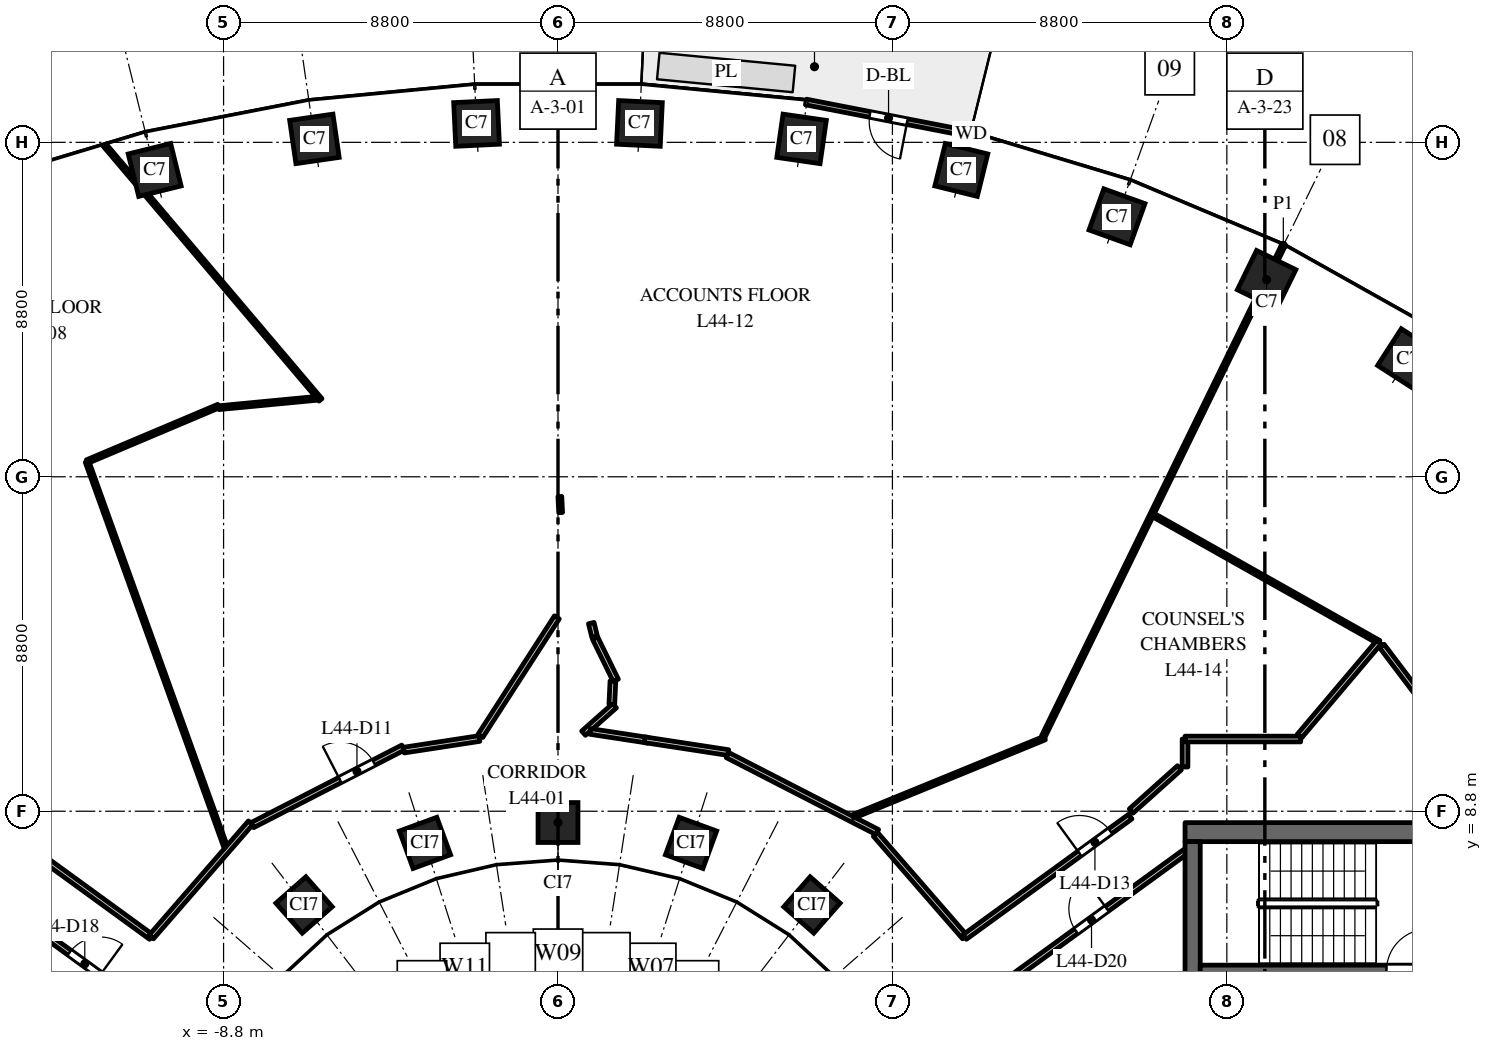
"""IFC4 building model, lengths in metres.
Left out: names, types, materials, properties, quantities, classifications, styles, units other than length and angle.
Written with IfcOpenShell. Run it as: python <this file> out.ifc"""

import sys

from ifc_helpers import new_model, si_unit, direction, frame, frame_2d, origin, origin_2d, place, context, subcontext, project, spatial, rectangle, extrude, element, fill, save


model = new_model("IFC4")
c1 = context("Model", 3, precision=1e-05, world=origin(), true_north=direction((0.0, 1.0)))
c2 = subcontext(c1, "Body", "Model", "MODEL_VIEW")
j1 = project(units=[si_unit("LENGTHUNIT", "METRE"), si_unit("PLANEANGLEUNIT", "RADIAN")], contexts=[c1])
p1 = place(None, origin())
s1 = spatial("IfcSite", under=j1, at=p1, CompositionType="ELEMENT")
p2 = place(p1, origin())
s2 = spatial("IfcBuilding", under=s1, at=p2, CompositionType="ELEMENT")
p3 = place(p2, frame((0.0, 0.0, 190.0)))
s3 = spatial("IfcBuildingStorey", under=s2, at=p3, CompositionType="ELEMENT", Elevation=190.0)
for number, where, z_axis, x_axis in (
    (1, (22.362, 20.7, 0.0), (0.0, 0.0, 1.0), (-0.84, 0.542, 0.0)),
    (2, (18.646, 22.785, 0.0), (0.0, 0.0, 1.0), (-0.898, 0.439, 0.0)),
    (3, (14.709, 24.441, 0.0), (0.0, 0.0, 1.0), (-0.941, 0.338, 0.0)),
    (4, (10.613, 25.674, 0.0), (0.0, 0.0, 1.0), (-0.971, 0.24, 0.0)),
    (5, (6.409, 26.491, 0.0), (0.0, 0.0, 1.0), (-0.99, 0.143, 0.0)),
    (6, (2.143, 26.898, 0.0), (0.0, 0.0, 1.0), (-0.999, 0.048, 0.0)),
    (7, (-2.143, 26.898, 0.0), (0.0, 0.0, 1.0), (-0.999, -0.048, 0.0)),
    (8, (-6.409, 26.491, 0.0), (0.0, 0.0, 1.0), (-0.99, -0.143, 0.0)),
    (9, (-10.613, 25.674, 0.0), (0.0, 0.0, 1.0), (-0.971, -0.24, 0.0)),
):
    element("IfcColumn", number, at=place(p3, frame(where, z_axis=z_axis, x_axis=x_axis)), inside=s3, PredefinedType="COLUMN", context=c2, shape_type="SweptSolid", body=[
        extrude(rectangle(XDim=1.15, YDim=1.15, at=origin_2d()), origin(), (0.0, 0.0, 1.0), 4.0),
    ])
for number, where, z_axis, x_axis in (
    (10, (6.682, 6.334, 0.0), (0.0, 0.0, 1.0), (-0.751, 0.66, 0.0)),
    (11, (3.501, 7.967, 0.0), (0.0, 0.0, 1.0), (-0.939, 0.344, 0.0)),
    (12, (0.0, 8.503, 0.0), (0.0, 0.0, 1.0), (-1.0, 0.0, 0.0)),
    (13, (-3.501, 7.967, 0.0), (0.0, 0.0, 1.0), (-0.939, -0.344, 0.0)),
    (14, (-6.682, 6.334, 0.0), (0.0, 0.0, 1.0), (-0.751, -0.66, 0.0)),
):
    element("IfcColumn", number, at=place(p3, frame(where, z_axis=z_axis, x_axis=x_axis)), inside=s3, PredefinedType="COLUMN", context=c2, shape_type="SweptSolid", body=[
        extrude(rectangle(XDim=1.05, YDim=1.05, at=origin_2d()), origin(), (0.0, 0.0, 1.0), 4.0),
    ])
p4 = place(p3, frame((16.5, 8.25, 0.0), z_axis=(0.0, 0.0, 1.0), x_axis=(1.0, 0.0, 0.0)))
e15 = element("IfcWall", 15, at=p4, inside=s3, PredefinedType="SHEAR", context=c2, shape_type="SweptSolid", body=[
    extrude(rectangle(XDim=15.0, YDim=0.5, at=frame_2d((7.5, 0.0))), origin(), (0.0, 0.0, 1.0), 3.7),
])
p5 = place(p4, frame((6.9, 0.0, 0.0)))
e16 = element("IfcOpeningElement", 16, at=p5, cuts=e15, PredefinedType="OPENING", context=c2, shape_type="SweptSolid", body=[
    extrude(rectangle(XDim=1.2, YDim=2.1, at=frame_2d((0.6, 1.05))), frame((0.0, 0.26, 0.0), z_axis=(0.0, -1.0, 0.0), x_axis=(1.0, 0.0, 0.0)), (0.0, 0.0, 1.0), 0.52),
])
p6 = place(p4, frame((12.425, 0.0, 0.0)))
e17 = element("IfcOpeningElement", 17, at=p6, cuts=e15, PredefinedType="OPENING", context=c2, shape_type="SweptSolid", body=[
    extrude(rectangle(XDim=0.9, YDim=2.1, at=frame_2d((0.45, 1.05))), frame((0.0, 0.26, 0.0), z_axis=(0.0, -1.0, 0.0), x_axis=(1.0, 0.0, 0.0)), (0.0, 0.0, 1.0), 0.52),
])
p7 = place(p3, frame((16.7, -8.0, 0.0), z_axis=(0.0, 0.0, 1.0), x_axis=(0.0, 1.0, 0.0)))
e18 = element("IfcWall", 18, at=p7, inside=s3, PredefinedType="SHEAR", context=c2, shape_type="SweptSolid", body=[
    extrude(rectangle(XDim=16.0, YDim=0.4, at=frame_2d((8.0, 0.0))), origin(), (0.0, 0.0, 1.0), 3.7),
])
p8 = place(p3, frame((16.9, 4.6, 0.0), z_axis=(0.0, 0.0, 1.0), x_axis=(1.0, 0.0, 0.0)))
e19 = element("IfcWall", 19, at=p8, inside=s3, PredefinedType="SHEAR", context=c2, shape_type="SweptSolid", body=[
    extrude(rectangle(XDim=6.18, YDim=0.3, at=frame_2d((3.09, 0.0))), origin(), (0.0, 0.0, 1.0), 3.7),
])
p9 = place(p8, frame((4.9, 0.0, 0.0)))
e20 = element("IfcOpeningElement", 20, at=p9, cuts=e19, PredefinedType="OPENING", context=c2, shape_type="SweptSolid", body=[
    extrude(rectangle(XDim=1.1, YDim=2.1, at=frame_2d((0.55, 1.05))), frame((0.0, 0.16, 0.0), z_axis=(0.0, -1.0, 0.0), x_axis=(1.0, 0.0, 0.0)), (0.0, 0.0, 1.0), 0.32),
])
p10 = place(p3, frame((10.871, 26.617, 0.0), z_axis=(0.0, 0.0, 1.0), x_axis=(-0.981631174778, 0.190788460615, 0.0)))
e21 = element("IfcWall", 21, at=p10, inside=s3, PredefinedType="STANDARD", context=c2, shape_type="SweptSolid", body=[
    extrude(rectangle(XDim=4.426, YDim=0.15, at=frame_2d((2.213, 0.0))), origin(), (0.0, 0.0, 1.0), 3.7),
])
p11 = place(p10, frame((1.713, 0.0, 0.0)))
e22 = element("IfcOpeningElement", 22, at=p11, cuts=e21, PredefinedType="OPENING", context=c2, shape_type="SweptSolid", body=[
    extrude(rectangle(XDim=1.0, YDim=2.4, at=frame_2d((0.5, 1.2))), frame((0.0, 0.085, 0.0), z_axis=(0.0, -1.0, 0.0), x_axis=(1.0, 0.0, 0.0)), (0.0, 0.0, 1.0), 0.17),
])
p12 = place(p3, frame((-16.5, 7.727, 0.0), z_axis=(0.0, 0.0, 1.0), x_axis=(0.808900994583, -0.587944879188, 0.0)))
e23 = element("IfcWall", 23, at=p12, inside=s3, PredefinedType="PARTITIONING", context=c2, shape_type="SweptSolid", body=[
    extrude(rectangle(XDim=6.273, YDim=0.15, at=frame_2d((3.136, 0.0))), origin(), (0.0, 0.0, 1.0), 3.7),
])
p13 = place(p12, frame((4.504, 0.0, 0.0)))
e24 = element("IfcOpeningElement", 24, at=p13, cuts=e23, PredefinedType="OPENING", context=c2, shape_type="SweptSolid", body=[
    extrude(rectangle(XDim=1.0, YDim=2.1, at=frame_2d((0.5, 1.05))), frame((0.0, 0.085, 0.0), z_axis=(0.0, -1.0, 0.0), x_axis=(1.0, 0.0, 0.0)), (0.0, 0.0, 1.0), 0.17),
])
p14 = place(p3, frame((-15.059, 8.658, 0.0), z_axis=(0.0, 0.0, 1.0), x_axis=(0.808838005268, -0.588031530816, 0.0)))
e25 = element("IfcWall", 25, at=p14, inside=s3, PredefinedType="PARTITIONING", context=c2, shape_type="SweptSolid", body=[
    extrude(rectangle(XDim=5.386, YDim=0.15, at=frame_2d((2.693, 0.0))), origin(), (0.0, 0.0, 1.0), 3.7),
])
p15 = place(p3, frame((-12.393, 17.999, 0.0), z_axis=(0.0, 0.0, 1.0), x_axis=(0.921243349635, 0.388986748816, 0.0)))
e26 = element("IfcWall", 26, at=p15, inside=s3, PredefinedType="PARTITIONING", context=c2, shape_type="SweptSolid", body=[
    extrude(rectangle(XDim=3.756, YDim=0.1, at=frame_2d((1.878, 0.0))), origin(), (0.0, 0.0, 1.0), 3.7),
])
p16 = place(p3, frame((-12.393, 17.999, 0.0), z_axis=(0.0, 0.0, 1.0), x_axis=(0.338550172492, -0.940948341146, 0.0)))
e27 = element("IfcWall", 27, at=p16, inside=s3, PredefinedType="PARTITIONING", context=c2, shape_type="SweptSolid", body=[
    extrude(rectangle(XDim=10.775, YDim=0.1, at=frame_2d((5.388, 0.0))), origin(), (0.0, 0.0, 1.0), 2.85),
])
p17 = place(p3, frame((-11.925, 26.323, 0.0), z_axis=(0.0, 0.0, 1.0), x_axis=(0.646450651597, -0.762955801505, 0.0)))
e28 = element("IfcWall", 28, at=p17, inside=s3, PredefinedType="PARTITIONING", context=c2, shape_type="SweptSolid", body=[
    extrude(rectangle(XDim=8.78, YDim=0.1, at=frame_2d((4.39, 0.0))), origin(), (0.0, 0.0, 1.0), 2.85),
])
p18 = place(p3, frame((-10.703, 5.491, 0.0), z_axis=(0.0, 0.0, 1.0), x_axis=(0.656266732873, 0.754528975802, 0.0)))
e29 = element("IfcWall", 29, at=p18, inside=s3, PredefinedType="PARTITIONING", context=c2, shape_type="SweptSolid", body=[
    extrude(rectangle(XDim=3.983, YDim=0.15, at=frame_2d((1.991, 0.0))), origin(), (0.0, 0.0, 1.0), 2.75),
])
p19 = place(p3, frame((-8.923, 19.418, 0.0), z_axis=(0.0, 0.0, 1.0), x_axis=(0.995460608392, 0.095174456346, 0.0)))
e30 = element("IfcWall", 30, at=p19, inside=s3, PredefinedType="PARTITIONING", context=c2, shape_type="SweptSolid", body=[
    extrude(rectangle(XDim=2.586, YDim=0.1, at=frame_2d((1.293, 0.0))), origin(), (0.0, 0.0, 1.0), 2.85),
])
p20 = place(p3, frame((-8.042, 8.435, 0.0), z_axis=(0.0, 0.0, 1.0), x_axis=(0.88929925529, 0.457325742268, 0.0)))
e31 = element("IfcWall", 31, at=p20, inside=s3, PredefinedType="PARTITIONING", context=c2, shape_type="SweptSolid", body=[
    extrude(rectangle(XDim=4.459, YDim=0.15, at=frame_2d((2.229, 0.0))), origin(), (0.0, 0.0, 1.0), 2.85),
])
p21 = place(p20, frame((2.594, 0.0, 0.0)))
e32 = element("IfcOpeningElement", 32, at=p21, cuts=e31, PredefinedType="OPENING", context=c2, shape_type="SweptSolid", body=[
    extrude(rectangle(XDim=1.0, YDim=2.1, at=frame_2d((0.5, 1.05))), frame((0.0, 0.085, 0.0), z_axis=(0.0, -1.0, 0.0), x_axis=(1.0, 0.0, 0.0)), (0.0, 0.0, 1.0), 0.17),
])
p22 = place(p3, frame((-4.056, 10.408, 0.0), z_axis=(0.0, 0.0, 1.0), x_axis=(0.988437567576, 0.151628410943, 0.0)))
e33 = element("IfcWall", 33, at=p22, inside=s3, PredefinedType="PARTITIONING", context=c2, shape_type="SweptSolid", body=[
    extrude(rectangle(XDim=2.011, YDim=0.15, at=frame_2d((1.005, 0.0))), origin(), (0.0, 0.0, 1.0), 3.7),
])
p23 = place(p3, frame((-2.044, 10.78, 0.0), z_axis=(0.0, 0.0, 1.0), x_axis=(0.542215200434, 0.840239654157, 0.0)))
e34 = element("IfcWall", 34, at=p23, inside=s3, PredefinedType="PARTITIONING", context=c2, shape_type="SweptSolid", body=[
    extrude(rectangle(XDim=3.714, YDim=0.15, at=frame_2d((1.857, 0.0))), origin(), (0.0, 0.0, 1.0), 2.85),
])
p24 = place(p3, frame((0.049, 17.081, 0.0), z_axis=(0.0, 0.0, 1.0), x_axis=(0.047263912187, -0.998882436829, 0.0)))
e35 = element("IfcWall", 35, at=p24, inside=s3, PredefinedType="PARTITIONING", context=c2, shape_type="SweptSolid", body=[
    extrude(rectangle(XDim=0.424, YDim=0.1, at=frame_2d((0.212, 0.0))), origin(), (0.0, 0.0, 1.0), 3.7),
])
p25 = place(p3, frame((0.673, 10.854, 0.0), z_axis=(0.0, 0.0, 1.0), x_axis=(0.748534116479, 0.663096279937, 0.0)))
e36 = element("IfcWall", 36, at=p25, inside=s3, PredefinedType="PARTITIONING", context=c2, shape_type="SweptSolid", body=[
    extrude(rectangle(XDim=1.089, YDim=0.15, at=frame_2d((0.544, 0.0))), origin(), (0.0, 0.0, 1.0), 3.7),
])
p26 = place(p3, frame((0.845, 10.9, 0.0), z_axis=(0.0, 0.0, 1.0), x_axis=(0.988539396125, -0.15096311572, 0.0)))
e37 = element("IfcWall", 37, at=p26, inside=s3, PredefinedType="PARTITIONING", context=c2, shape_type="SweptSolid", body=[
    extrude(rectangle(XDim=1.543, YDim=0.15, at=frame_2d((0.771, 0.0))), origin(), (0.0, 0.0, 1.0), 3.7),
])
p27 = place(p3, frame((0.875, 13.751, 0.0), z_axis=(0.0, 0.0, 1.0), x_axis=(0.239631306226, -0.970863964249, 0.0)))
e38 = element("IfcWall", 38, at=p27, inside=s3, PredefinedType="PARTITIONING", context=c2, shape_type="SweptSolid", body=[
    extrude(rectangle(XDim=0.376, YDim=0.15, at=frame_2d((0.188, 0.0))), origin(), (0.0, 0.0, 1.0), 3.7),
])
p28 = place(p3, frame((0.977, 13.353, 0.0), z_axis=(0.0, 0.0, 1.0), x_axis=(0.439698529064, -0.898145424494, 0.0)))
e39 = element("IfcWall", 39, at=p28, inside=s3, PredefinedType="PARTITIONING", context=c2, shape_type="SweptSolid", body=[
    extrude(rectangle(XDim=1.237, YDim=0.15, at=frame_2d((0.619, 0.0))), origin(), (0.0, 0.0, 1.0), 3.7),
])
p29 = place(p3, frame((1.416, 11.612, 0.0), z_axis=(0.0, 0.0, 1.0), x_axis=(0.047263226181, 0.998882469288, 0.0)))
e40 = element("IfcWall", 40, at=p29, inside=s3, PredefinedType="PARTITIONING", context=c2, shape_type="SweptSolid", body=[
    extrude(rectangle(XDim=0.615, YDim=0.15, at=frame_2d((0.307, 0.0))), origin(), (0.0, 0.0, 1.0), 3.7),
])
p30 = place(p3, frame((2.277, 10.681, 0.0), z_axis=(0.0, 0.0, 1.0), x_axis=(0.988505563548, -0.151184492707, 0.0)))
e41 = element("IfcWall", 41, at=p30, inside=s3, PredefinedType="PARTITIONING", context=c2, shape_type="SweptSolid", body=[
    extrude(rectangle(XDim=2.229, YDim=0.15, at=frame_2d((1.114, 0.0))), origin(), (0.0, 0.0, 1.0), 2.85),
])
p31 = place(p3, frame((4.459, 10.278, 0.0), z_axis=(0.0, 0.0, 1.0), x_axis=(0.889360097773, -0.457207410799, 0.0)))
e42 = element("IfcWall", 42, at=p31, inside=s3, PredefinedType="PARTITIONING", context=c2, shape_type="SweptSolid", body=[
    extrude(rectangle(XDim=4.434, YDim=0.15, at=frame_2d((2.217, 0.0))), origin(), (0.0, 0.0, 1.0), 2.85),
])
p32 = place(p3, frame((7.765, 8.662, 0.0), z_axis=(0.0, 0.0, 1.0), x_axis=(0.92549839732, 0.378751523506, 0.0)))
e43 = element("IfcWall", 43, at=p32, inside=s3, PredefinedType="PARTITIONING", context=c2, shape_type="SweptSolid", body=[
    extrude(rectangle(XDim=5.447, YDim=0.1, at=frame_2d((2.723, 0.0))), origin(), (0.0, 0.0, 1.0), 3.7),
])
p33 = place(p3, frame((8.355, 8.19, 0.0), z_axis=(0.0, 0.0, 1.0), x_axis=(0.656332459324, -0.754471803871, 0.0)))
e44 = element("IfcWall", 44, at=p33, inside=s3, PredefinedType="PARTITIONING", context=c2, shape_type="SweptSolid", body=[
    extrude(rectangle(XDim=3.577, YDim=0.15, at=frame_2d((1.789, 0.0))), origin(), (0.0, 0.0, 1.0), 2.75),
])
p34 = place(p3, frame((10.703, 5.491, 0.0), z_axis=(0.0, 0.0, 1.0), x_axis=(0.808838005268, 0.588031530816, 0.0)))
e45 = element("IfcWall", 45, at=p34, inside=s3, PredefinedType="PARTITIONING", context=c2, shape_type="SweptSolid", body=[
    extrude(rectangle(XDim=5.386, YDim=0.15, at=frame_2d((2.693, 0.0))), origin(), (0.0, 0.0, 1.0), 2.75),
])
p35 = place(p34, frame((3.736, 0.0, 0.0)))
e46 = element("IfcOpeningElement", 46, at=p35, cuts=e45, PredefinedType="OPENING", context=c2, shape_type="SweptSolid", body=[
    extrude(rectangle(XDim=1.0, YDim=2.1, at=frame_2d((0.5, 1.05))), frame((0.0, 0.085, 0.0), z_axis=(0.0, -1.0, 0.0), x_axis=(1.0, 0.0, 0.0)), (0.0, 0.0, 1.0), 0.17),
])
p36 = place(p3, frame((11.556, 4.133, 0.0), z_axis=(0.0, 0.0, 1.0), x_axis=(0.808869060288, 0.587988812231, 0.0)))
e47 = element("IfcWall", 47, at=p36, inside=s3, PredefinedType="PARTITIONING", context=c2, shape_type="SweptSolid", body=[
    extrude(rectangle(XDim=6.112, YDim=0.15, at=frame_2d((3.056, 0.0))), origin(), (0.0, 0.0, 1.0), 3.7),
])
p37 = place(p36, frame((2.57, 0.0, 0.0)))
e48 = element("IfcOpeningElement", 48, at=p37, cuts=e47, PredefinedType="OPENING", context=c2, shape_type="SweptSolid", body=[
    extrude(rectangle(XDim=1.0, YDim=2.1, at=frame_2d((0.5, 1.05))), frame((0.0, 0.085, 0.0), z_axis=(0.0, -1.0, 0.0), x_axis=(1.0, 0.0, 0.0)), (0.0, 0.0, 1.0), 0.17),
])
p38 = place(p3, frame((12.769, 10.765, 0.0), z_axis=(0.0, 0.0, 1.0), x_axis=(0.439230835686, 0.898374238824, 0.0)))
e49 = element("IfcWall", 49, at=p38, inside=s3, PredefinedType="PARTITIONING", context=c2, shape_type="SweptSolid", body=[
    extrude(rectangle(XDim=14.382, YDim=0.1, at=frame_2d((7.191, 0.0))), origin(), (0.0, 0.0, 1.0), 2.9),
])
p39 = place(p3, frame((15.673, 16.589, 0.0), z_axis=(0.0, 0.0, 1.0), x_axis=(0.871231423664, -0.490872495074, 0.0)))
e50 = element("IfcWall", 50, at=p39, inside=s3, PredefinedType="PARTITIONING", context=c2, shape_type="SweptSolid", body=[
    extrude(rectangle(XDim=6.806, YDim=0.1, at=frame_2d((3.403, 0.0))), origin(), (0.0, 0.0, 1.0), 3.7),
])
p40 = place(p3, frame((16.5, 9.964, 0.0), z_axis=(0.0, 0.0, 1.0), x_axis=(0.0, 1.0, 0.0)))
e51 = element("IfcWall", 51, at=p40, inside=s3, PredefinedType="PARTITIONING", context=c2, shape_type="SweptSolid", body=[
    extrude(rectangle(XDim=0.736, YDim=0.15, at=frame_2d((0.368, 0.0))), origin(), (0.0, 0.0, 1.0), 3.7),
])
p41 = place(p3, frame((16.5, 10.7, 0.0), z_axis=(0.0, 0.0, 1.0), x_axis=(1.0, 0.0, 0.0)))
e52 = element("IfcWall", 52, at=p41, inside=s3, PredefinedType="PARTITIONING", context=c2, shape_type="SweptSolid", body=[
    extrude(rectangle(XDim=3.043, YDim=0.15, at=frame_2d((1.521, 0.0))), origin(), (0.0, 0.0, 1.0), 3.7),
])
p42 = place(p3, frame((19.511, 10.778, 0.0), z_axis=(0.0, 0.0, 1.0), x_axis=(0.646314086505, 0.763071491792, 0.0)))
e53 = element("IfcWall", 53, at=p42, inside=s3, PredefinedType="PARTITIONING", context=c2, shape_type="SweptSolid", body=[
    extrude(rectangle(XDim=3.237, YDim=0.15, at=frame_2d((1.618, 0.0))), origin(), (0.0, 0.0, 1.0), 3.7),
])
p43 = place(p3, frame((21.679, 13.148, 0.0), z_axis=(0.0, 0.0, 1.0), x_axis=(0.602984875358, -0.797752618353, 0.0)))
e54 = element("IfcWall", 54, at=p43, inside=s3, PredefinedType="PARTITIONING", context=c2, shape_type="SweptSolid", body=[
    extrude(rectangle(XDim=3.163, YDim=0.15, at=frame_2d((1.581, 0.0))), origin(), (0.0, 0.0, 1.0), 2.75),
])
p44 = place(p3, frame((15.084, 8.806, 0.0), z_axis=(0.0, 0.0, 1.0), x_axis=(0.744832366149, 0.667251636444, 0.0)))
e55 = element("IfcWall", 55, at=p44, inside=s3, PredefinedType="PARTITIONING", context=c2, shape_type="SweptSolid", body=[
    extrude(rectangle(XDim=1.702, YDim=0.15, at=frame_2d((0.851, 0.0))), origin(), (0.0, 0.0, 1.0), 3.7),
])
p45 = place(p9, origin())
e56 = element("IfcDoor", 56, at=p45, inside=s3, OperationType="SINGLE_SWING_LEFT", PredefinedType="DOOR", context=c2, shape_type="SweptSolid", body=[
    extrude(rectangle(XDim=1.1, YDim=2.1, at=frame_2d((0.55, 1.05))), frame((0.0, 0.025, 0.0), z_axis=(0.0, -1.0, 0.0), x_axis=(1.0, 0.0, 0.0)), (0.0, 0.0, 1.0), 0.05),
])
fill(e20, e56)
p46 = place(p11, origin())
e57 = element("IfcDoor", 57, at=p46, inside=s3, OperationType="SINGLE_SWING_LEFT", PredefinedType="DOOR", context=c2, shape_type="SweptSolid", body=[
    extrude(rectangle(XDim=1.0, YDim=2.4, at=frame_2d((0.5, 1.2))), frame((0.0, 0.025, 0.0), z_axis=(0.0, -1.0, 0.0), x_axis=(1.0, 0.0, 0.0)), (0.0, 0.0, 1.0), 0.05),
])
fill(e22, e57)
p47 = place(p21, origin())
e58 = element("IfcDoor", 58, at=p47, inside=s3, OperationType="SINGLE_SWING_LEFT", PredefinedType="DOOR", context=c2, shape_type="SweptSolid", body=[
    extrude(rectangle(XDim=1.0, YDim=2.1, at=frame_2d((0.5, 1.05))), frame((0.0, 0.025, 0.0), z_axis=(0.0, -1.0, 0.0), x_axis=(1.0, 0.0, 0.0)), (0.0, 0.0, 1.0), 0.05),
])
fill(e32, e58)
p48 = place(p35, origin())
e59 = element("IfcDoor", 59, at=p48, inside=s3, OperationType="SINGLE_SWING_LEFT", PredefinedType="DOOR", context=c2, shape_type="SweptSolid", body=[
    extrude(rectangle(XDim=1.0, YDim=2.1, at=frame_2d((0.5, 1.05))), frame((0.0, 0.025, 0.0), z_axis=(0.0, -1.0, 0.0), x_axis=(1.0, 0.0, 0.0)), (0.0, 0.0, 1.0), 0.05),
])
fill(e46, e59)
p49 = place(p13, origin())
e60 = element("IfcDoor", 60, at=p49, inside=s3, OperationType="SINGLE_SWING_RIGHT", PredefinedType="DOOR", context=c2, shape_type="SweptSolid", body=[
    extrude(rectangle(XDim=1.0, YDim=2.1, at=frame_2d((0.5, 1.05))), frame((0.0, 0.025, 0.0), z_axis=(0.0, -1.0, 0.0), x_axis=(1.0, 0.0, 0.0)), (0.0, 0.0, 1.0), 0.05),
])
fill(e24, e60)
p50 = place(p37, origin())
e61 = element("IfcDoor", 61, at=p50, inside=s3, OperationType="SINGLE_SWING_RIGHT", PredefinedType="DOOR", context=c2, shape_type="SweptSolid", body=[
    extrude(rectangle(XDim=1.0, YDim=2.1, at=frame_2d((0.5, 1.05))), frame((0.0, 0.025, 0.0), z_axis=(0.0, -1.0, 0.0), x_axis=(1.0, 0.0, 0.0)), (0.0, 0.0, 1.0), 0.05),
])
fill(e48, e61)
save(model, sys.argv[1])
